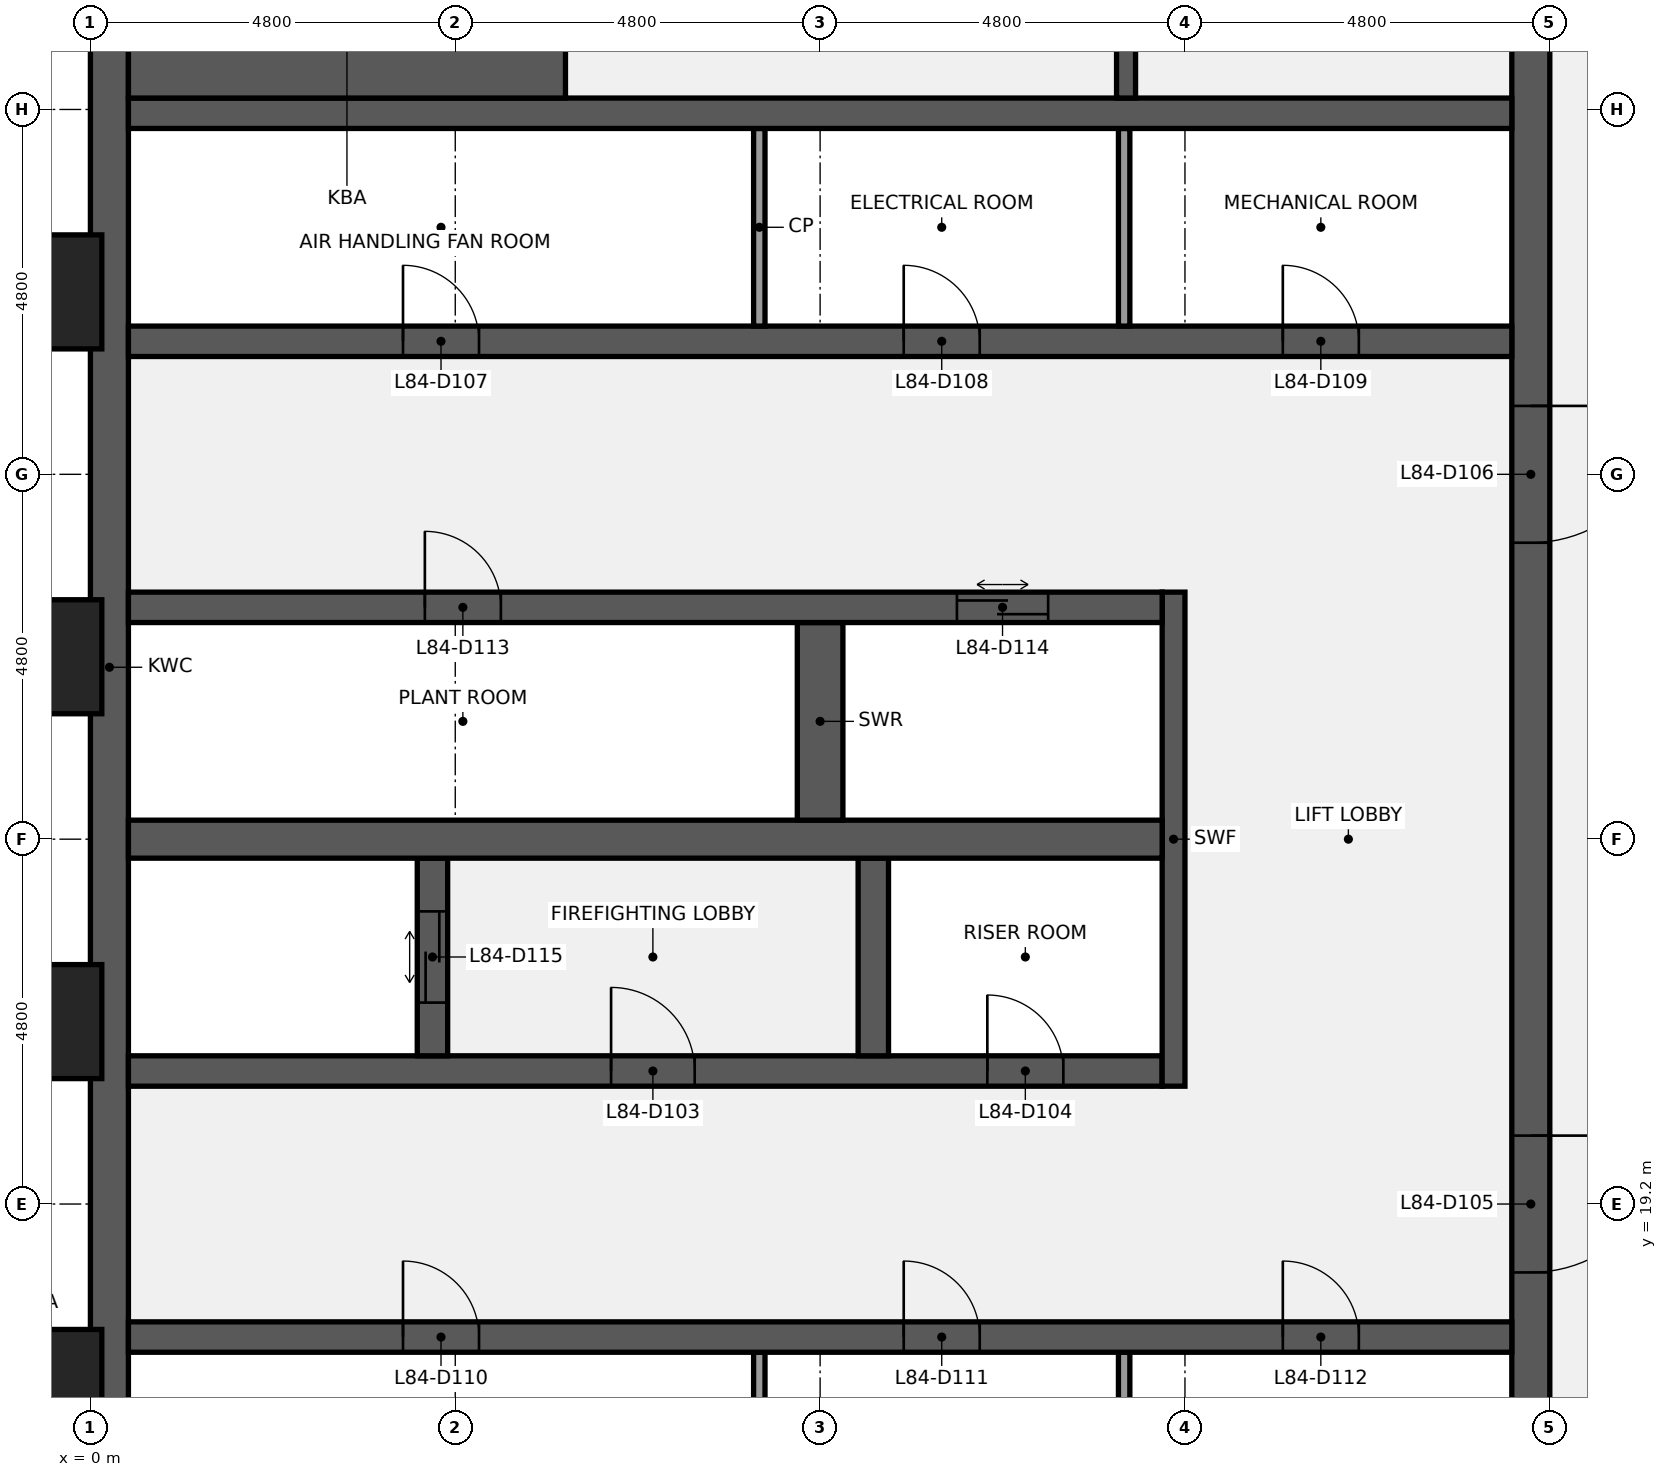
"""IFC4 building model, lengths in metres.
Left out: names, types, materials, properties, quantities, classifications, styles, units other than length and angle.
Written with IfcOpenShell. Run it as: python <this file> out.ifc"""

import sys

from ifc_helpers import new_model, si_unit, direction, frame, frame_2d, origin, origin_2d, place, context, subcontext, project, spatial, polyline, rectangle, outline, extrude, element, fill, save


model = new_model("IFC4")
c1 = context("Model", 3, precision=1e-05, world=origin(), true_north=direction((0.0, 1.0)))
c2 = subcontext(c1, "Body", "Model", "MODEL_VIEW")
j1 = project(units=[si_unit("LENGTHUNIT", "METRE"), si_unit("PLANEANGLEUNIT", "RADIAN")], contexts=[c1])
p1 = place(None, origin())
s1 = spatial("IfcSite", under=j1, at=p1, CompositionType="ELEMENT")
p2 = place(p1, origin())
s2 = spatial("IfcBuilding", under=s1, at=p2, CompositionType="ELEMENT")
p3 = place(p2, frame((0.0, 0.0, 374.3)))
s3 = spatial("IfcBuildingStorey", under=s2, at=p3, CompositionType="ELEMENT", Elevation=374.3)
p4 = place(p3, frame((0.25, 14.124, 0.0), z_axis=(0.0, 0.0, 1.0), x_axis=(0.0, 1.0, 0.0)))
e1 = element("IfcWall", 1, at=p4, inside=s3, PredefinedType="SHEAR", context=c2, shape_type="SweptSolid", body=[
    extrude(outline(polyline([(0.0, 0.0), (24.276, 0.0), (24.277, 27.067), (0.0, 2.488), (0.0, 0.0)])), frame((0.0, 0.25, 0.0), z_axis=(0.0, -1.0, 0.0), x_axis=(1.0, 0.0, 0.0)), (0.0, 0.0, 1.0), 0.5),
])
p5 = place(p3, frame((18.95, 38.4, 0.0), z_axis=(0.0, 0.0, 1.0), x_axis=(0.0, -1.0, 0.0)))
e2 = element("IfcWall", 2, at=p5, inside=s3, PredefinedType="SHEAR", context=c2, shape_type="SweptSolid", body=[
    extrude(outline(polyline([(0.0, 0.0), (24.276, 0.0), (24.277, 2.488), (0.0, 27.067), (0.0, 0.0)])), frame((0.0, 0.25, 0.0), z_axis=(0.0, -1.0, 0.0), x_axis=(1.0, 0.0, 0.0)), (0.0, 0.0, 1.0), 0.5),
])
p6 = place(p5, frame((18.3, 0.0, 0.0)))
e3 = element("IfcOpeningElement", 3, at=p6, cuts=e2, PredefinedType="OPENING", context=c2, shape_type="SweptSolid", body=[
    extrude(rectangle(XDim=1.8, YDim=2.1, at=frame_2d((0.9, 1.05))), frame((0.0, 0.26, 0.0), z_axis=(0.0, -1.0, 0.0), x_axis=(1.0, 0.0, 0.0)), (0.0, 0.0, 1.0), 0.52),
])
p7 = place(p5, frame((8.7, 0.0, 0.0)))
e4 = element("IfcOpeningElement", 4, at=p7, cuts=e2, PredefinedType="OPENING", context=c2, shape_type="SweptSolid", body=[
    extrude(rectangle(XDim=1.8, YDim=2.1, at=frame_2d((0.9, 1.05))), frame((0.0, 0.26, 0.0), z_axis=(0.0, -1.0, 0.0), x_axis=(1.0, 0.0, 0.0)), (0.0, 0.0, 1.0), 0.52),
])
for number, where, z_axis, x_axis in (
    (5, (8.8, 14.65, 0.0), (0.0, 0.0, 1.0), (0.0, 1.0, 0.0)),
    (6, (13.6, 14.65, 0.0), (0.0, 0.0, 1.0), (0.0, 1.0, 0.0)),
):
    element("IfcWall", number, at=place(p3, frame(where, z_axis=z_axis, x_axis=x_axis)), inside=s3, PredefinedType="PARTITIONING", context=c2, shape_type="SweptSolid", body=[
        extrude(outline(polyline([(0.0, 0.0), (2.6, 0.0), (2.6, 5.653), (0.0, 3.021), (0.0, 0.0)])), frame((0.0, 0.075, 0.0), z_axis=(0.0, -1.0, 0.0), x_axis=(1.0, 0.0, 0.0)), (0.0, 0.0, 1.0), 0.15),
    ])
p8 = place(p3, frame((0.5, 17.45, 0.0), z_axis=(0.0, 0.0, 1.0), x_axis=(1.0, 0.0, 0.0)))
e7 = element("IfcWall", 7, at=p8, inside=s3, PredefinedType="SHEAR", context=c2, shape_type="SweptSolid", body=[
    extrude(outline(polyline([(0.0, 0.0), (18.2, 0.0), (18.2, 5.855), (0.0, 5.855), (0.0, 0.0)])), frame((0.0, 0.2, 0.0), z_axis=(0.0, -1.0, 0.0), x_axis=(1.0, 0.0, 0.0)), (0.0, 0.0, 1.0), 0.4),
])
p9 = place(p8, frame((3.613, 0.0, 0.0)))
e8 = element("IfcOpeningElement", 8, at=p9, cuts=e7, PredefinedType="OPENING", context=c2, shape_type="SweptSolid", body=[
    extrude(rectangle(XDim=1.0, YDim=2.1, at=frame_2d((0.5, 1.05))), frame((0.0, 0.21, 0.0), z_axis=(0.0, -1.0, 0.0), x_axis=(1.0, 0.0, 0.0)), (0.0, 0.0, 1.0), 0.42),
])
p10 = place(p8, frame((10.2, 0.0, 0.0)))
e9 = element("IfcOpeningElement", 9, at=p10, cuts=e7, PredefinedType="OPENING", context=c2, shape_type="SweptSolid", body=[
    extrude(rectangle(XDim=1.0, YDim=2.1, at=frame_2d((0.5, 1.05))), frame((0.0, 0.21, 0.0), z_axis=(0.0, -1.0, 0.0), x_axis=(1.0, 0.0, 0.0)), (0.0, 0.0, 1.0), 0.42),
])
p11 = place(p8, frame((15.188, 0.0, 0.0)))
e10 = element("IfcOpeningElement", 10, at=p11, cuts=e7, PredefinedType="OPENING", context=c2, shape_type="SweptSolid", body=[
    extrude(rectangle(XDim=1.0, YDim=2.1, at=frame_2d((0.5, 1.05))), frame((0.0, 0.21, 0.0), z_axis=(0.0, -1.0, 0.0), x_axis=(1.0, 0.0, 0.0)), (0.0, 0.0, 1.0), 0.42),
])
p12 = place(p3, frame((0.5, 20.95, 0.0), z_axis=(0.0, 0.0, 1.0), x_axis=(1.0, 0.0, 0.0)))
e11 = element("IfcWall", 11, at=p12, inside=s3, PredefinedType="SHEAR", context=c2, shape_type="SweptSolid", body=[
    extrude(outline(polyline([(0.0, 0.0), (13.6, 0.0), (13.6, 9.399), (0.0, 9.399), (0.0, 0.0)])), frame((0.0, 0.2, 0.0), z_axis=(0.0, -1.0, 0.0), x_axis=(1.0, 0.0, 0.0)), (0.0, 0.0, 1.0), 0.4),
])
p13 = place(p12, frame((6.35, 0.0, 0.0)))
e12 = element("IfcOpeningElement", 12, at=p13, cuts=e11, PredefinedType="OPENING", context=c2, shape_type="SweptSolid", body=[
    extrude(rectangle(XDim=1.1, YDim=2.1, at=frame_2d((0.55, 1.05))), frame((0.0, 0.21, 0.0), z_axis=(0.0, -1.0, 0.0), x_axis=(1.0, 0.0, 0.0)), (0.0, 0.0, 1.0), 0.42),
])
p14 = place(p12, frame((11.3, 0.0, 0.0)))
e13 = element("IfcOpeningElement", 13, at=p14, cuts=e11, PredefinedType="OPENING", context=c2, shape_type="SweptSolid", body=[
    extrude(rectangle(XDim=1.0, YDim=2.1, at=frame_2d((0.5, 1.05))), frame((0.0, 0.21, 0.0), z_axis=(0.0, -1.0, 0.0), x_axis=(1.0, 0.0, 0.0)), (0.0, 0.0, 1.0), 0.42),
])
p15 = place(p3, frame((14.25, 20.75, 0.0), z_axis=(0.0, 0.0, 1.0), x_axis=(0.0, 1.0, 0.0)))
e14 = element("IfcWall", 14, at=p15, inside=s3, PredefinedType="SHEAR", context=c2, shape_type="SweptSolid", body=[
    extrude(outline(polyline([(0.0, 0.0), (6.5, 0.0), (6.5, 15.778), (0.0, 9.197), (0.0, 0.0)])), frame((0.0, 0.15, 0.0), z_axis=(0.0, -1.0, 0.0), x_axis=(1.0, 0.0, 0.0)), (0.0, 0.0, 1.0), 0.3),
])
p16 = place(p3, frame((4.5, 21.15, 0.0), z_axis=(0.0, 0.0, 1.0), x_axis=(0.0, 1.0, 0.0)))
e15 = element("IfcWall", 15, at=p16, inside=s3, PredefinedType="SHEAR", context=c2, shape_type="SweptSolid", body=[
    extrude(outline(polyline([(0.0, 0.0), (2.6, 0.0), (2.6, 12.234), (0.0, 9.602), (0.0, 0.0)])), frame((0.0, 0.2, 0.0), z_axis=(0.0, -1.0, 0.0), x_axis=(1.0, 0.0, 0.0)), (0.0, 0.0, 1.0), 0.4),
])
p17 = place(p16, frame((0.7, 0.0, 0.0)))
e16 = element("IfcOpeningElement", 16, at=p17, cuts=e15, PredefinedType="OPENING", context=c2, shape_type="SweptSolid", body=[
    extrude(rectangle(XDim=1.2, YDim=2.1, at=frame_2d((0.6, 1.05))), frame((0.0, 0.21, 0.0), z_axis=(0.0, -1.0, 0.0), x_axis=(1.0, 0.0, 0.0)), (0.0, 0.0, 1.0), 0.42),
])
p18 = place(p3, frame((10.3, 21.15, 0.0), z_axis=(0.0, 0.0, 1.0), x_axis=(0.0, 1.0, 0.0)))
e17 = element("IfcWall", 17, at=p18, inside=s3, PredefinedType="SHEAR", context=c2, shape_type="SweptSolid", body=[
    extrude(outline(polyline([(0.0, 0.0), (2.6, 0.0), (2.6, 12.234), (0.0, 9.602), (0.0, 0.0)])), frame((0.0, 0.2, 0.0), z_axis=(0.0, -1.0, 0.0), x_axis=(1.0, 0.0, 0.0)), (0.0, 0.0, 1.0), 0.4),
])
p19 = place(p3, frame((0.5, 24.0, 0.0), z_axis=(0.0, 0.0, 1.0), x_axis=(1.0, 0.0, 0.0)))
e18 = element("IfcWall", 18, at=p19, inside=s3, PredefinedType="SHEAR", context=c2, shape_type="SweptSolid", body=[
    extrude(outline(polyline([(0.0, 0.0), (13.6, 0.0), (13.6, 12.488), (0.0, 12.488), (0.0, 0.0)])), frame((0.0, 0.25, 0.0), z_axis=(0.0, -1.0, 0.0), x_axis=(1.0, 0.0, 0.0)), (0.0, 0.0, 1.0), 0.5),
])
p20 = place(p3, frame((9.6, 24.25, 0.0), z_axis=(0.0, 0.0, 1.0), x_axis=(0.0, 1.0, 0.0)))
e19 = element("IfcWall", 19, at=p20, inside=s3, PredefinedType="SHEAR", context=c2, shape_type="SweptSolid", body=[
    extrude(outline(polyline([(0.0, 0.0), (2.6, 0.0), (2.6, 15.373), (0.0, 12.74), (0.0, 0.0)])), frame((0.0, 0.3, 0.0), z_axis=(0.0, -1.0, 0.0), x_axis=(1.0, 0.0, 0.0)), (0.0, 0.0, 1.0), 0.6),
])
p21 = place(p3, frame((0.5, 27.05, 0.0), z_axis=(0.0, 0.0, 1.0), x_axis=(1.0, 0.0, 0.0)))
e20 = element("IfcWall", 20, at=p21, inside=s3, PredefinedType="SHEAR", context=c2, shape_type="SweptSolid", body=[
    extrude(outline(polyline([(0.0, 0.0), (13.6, 0.0), (13.6, 15.576), (0.0, 15.576), (0.0, 0.0)])), frame((0.0, 0.2, 0.0), z_axis=(0.0, -1.0, 0.0), x_axis=(1.0, 0.0, 0.0)), (0.0, 0.0, 1.0), 0.4),
])
p22 = place(p21, frame((3.9, 0.0, 0.0)))
e21 = element("IfcOpeningElement", 21, at=p22, cuts=e20, PredefinedType="OPENING", context=c2, shape_type="SweptSolid", body=[
    extrude(rectangle(XDim=1.0, YDim=2.1, at=frame_2d((0.5, 1.05))), frame((0.0, 0.21, 0.0), z_axis=(0.0, -1.0, 0.0), x_axis=(1.0, 0.0, 0.0)), (0.0, 0.0, 1.0), 0.42),
])
p23 = place(p21, frame((10.9, 0.0, 0.0)))
e22 = element("IfcOpeningElement", 22, at=p23, cuts=e20, PredefinedType="OPENING", context=c2, shape_type="SweptSolid", body=[
    extrude(rectangle(XDim=1.2, YDim=2.1, at=frame_2d((0.6, 1.05))), frame((0.0, 0.21, 0.0), z_axis=(0.0, -1.0, 0.0), x_axis=(1.0, 0.0, 0.0)), (0.0, 0.0, 1.0), 0.42),
])
p24 = place(p3, frame((0.5, 30.55, 0.0), z_axis=(0.0, 0.0, 1.0), x_axis=(1.0, 0.0, 0.0)))
e23 = element("IfcWall", 23, at=p24, inside=s3, PredefinedType="SHEAR", context=c2, shape_type="SweptSolid", body=[
    extrude(outline(polyline([(0.0, 0.0), (18.2, 0.0), (18.2, 19.119), (0.0, 19.119), (0.0, 0.0)])), frame((0.0, 0.2, 0.0), z_axis=(0.0, -1.0, 0.0), x_axis=(1.0, 0.0, 0.0)), (0.0, 0.0, 1.0), 0.4),
])
p25 = place(p24, frame((3.613, 0.0, 0.0)))
e24 = element("IfcOpeningElement", 24, at=p25, cuts=e23, PredefinedType="OPENING", context=c2, shape_type="SweptSolid", body=[
    extrude(rectangle(XDim=1.0, YDim=2.1, at=frame_2d((0.5, 1.05))), frame((0.0, 0.21, 0.0), z_axis=(0.0, -1.0, 0.0), x_axis=(1.0, 0.0, 0.0)), (0.0, 0.0, 1.0), 0.42),
])
p26 = place(p24, frame((10.2, 0.0, 0.0)))
e25 = element("IfcOpeningElement", 25, at=p26, cuts=e23, PredefinedType="OPENING", context=c2, shape_type="SweptSolid", body=[
    extrude(rectangle(XDim=1.0, YDim=2.1, at=frame_2d((0.5, 1.05))), frame((0.0, 0.21, 0.0), z_axis=(0.0, -1.0, 0.0), x_axis=(1.0, 0.0, 0.0)), (0.0, 0.0, 1.0), 0.42),
])
p27 = place(p24, frame((15.188, 0.0, 0.0)))
e26 = element("IfcOpeningElement", 26, at=p27, cuts=e23, PredefinedType="OPENING", context=c2, shape_type="SweptSolid", body=[
    extrude(rectangle(XDim=1.0, YDim=2.1, at=frame_2d((0.5, 1.05))), frame((0.0, 0.21, 0.0), z_axis=(0.0, -1.0, 0.0), x_axis=(1.0, 0.0, 0.0)), (0.0, 0.0, 1.0), 0.42),
])
for number, where, z_axis, x_axis in (
    (27, (8.8, 30.75, 0.0), (0.0, 0.0, 1.0), (0.0, 1.0, 0.0)),
    (28, (13.6, 30.75, 0.0), (0.0, 0.0, 1.0), (0.0, 1.0, 0.0)),
):
    element("IfcWall", number, at=place(p3, frame(where, z_axis=z_axis, x_axis=x_axis)), inside=s3, PredefinedType="PARTITIONING", context=c2, shape_type="SweptSolid", body=[
        extrude(outline(polyline([(0.0, 0.0), (2.6, 0.0), (2.6, 21.954), (0.0, 19.322), (0.0, 0.0)])), frame((0.0, 0.075, 0.0), z_axis=(0.0, -1.0, 0.0), x_axis=(1.0, 0.0, 0.0)), (0.0, 0.0, 1.0), 0.15),
    ])
p28 = place(p3, frame((0.5, 33.55, 0.0), z_axis=(0.0, 0.0, 1.0), x_axis=(1.0, 0.0, 0.0)))
e29 = element("IfcWall", 29, at=p28, inside=s3, PredefinedType="SHEAR", context=c2, shape_type="SweptSolid", body=[
    extrude(outline(polyline([(0.0, 0.0), (18.2, 0.0), (18.2, 22.157), (0.0, 22.157), (0.0, 0.0)])), frame((0.0, 0.2, 0.0), z_axis=(0.0, -1.0, 0.0), x_axis=(1.0, 0.0, 0.0)), (0.0, 0.0, 1.0), 0.4),
])
p29 = place(p3, frame((0.5, 35.825, 0.0), z_axis=(0.0, 0.0, 1.0), x_axis=(1.0, 0.0, 0.0)))
e30 = element("IfcWall", 30, at=p29, inside=s3, PredefinedType="SHEAR", context=c2, shape_type="SweptSolid", body=[
    extrude(outline(polyline([(0.0, 0.0), (5.75, 0.0), (5.75, 24.46), (0.0, 24.46), (0.0, 0.0)])), frame((0.0, 2.075, 0.0), z_axis=(0.0, -1.0, 0.0), x_axis=(1.0, 0.0, 0.0)), (0.0, 0.0, 1.0), 4.15),
])
p30 = place(p3, frame((13.625, 33.75, 0.0), z_axis=(0.0, 0.0, 1.0), x_axis=(0.0, 1.0, 0.0)))
e31 = element("IfcWall", 31, at=p30, inside=s3, PredefinedType="SHEAR", context=c2, shape_type="SweptSolid", body=[
    extrude(outline(polyline([(0.0, 0.0), (3.45, 0.0), (3.45, 25.853), (0.0, 22.359), (0.0, 0.0)])), frame((0.0, 0.125, 0.0), z_axis=(0.0, -1.0, 0.0), x_axis=(1.0, 0.0, 0.0)), (0.0, 0.0, 1.0), 0.25),
])
p31 = place(p30, frame((1.175, 0.0, 0.0)))
e32 = element("IfcOpeningElement", 32, at=p31, cuts=e31, PredefinedType="OPENING", context=c2, shape_type="SweptSolid", body=[
    extrude(rectangle(XDim=1.1, YDim=2.1, at=frame_2d((0.55, 1.05))), frame((0.0, 0.135, 0.0), z_axis=(0.0, -1.0, 0.0), x_axis=(1.0, 0.0, 0.0)), (0.0, 0.0, 1.0), 0.27),
])
for number, where, z_axis, x_axis in (
    (33, (-0.75, 16.8, 0.0), (0.0, 0.0, 1.0), (0.0, 1.0, 0.0)),
    (34, (-0.75, 21.6, 0.0), (0.0, 0.0, 1.0), (0.0, 1.0, 0.0)),
    (35, (-0.75, 26.4, 0.0), (0.0, 0.0, 1.0), (0.0, 1.0, 0.0)),
    (36, (-0.75, 31.2, 0.0), (0.0, 0.0, 1.0), (0.0, 1.0, 0.0)),
):
    element("IfcColumn", number, at=place(p3, frame(where, z_axis=z_axis, x_axis=x_axis)), inside=s3, PredefinedType="PILASTER", context=c2, shape_type="SweptSolid", body=[
        extrude(rectangle(XDim=1.8, YDim=1.5, at=origin_2d()), origin(), (0.0, 0.0, 1.0), 4.0),
    ])
p32 = place(p13, origin())
e37 = element("IfcDoor", 37, at=p32, inside=s3, OperationType="SINGLE_SWING_LEFT", PredefinedType="DOOR", context=c2, shape_type="SweptSolid", body=[
    extrude(rectangle(XDim=1.1, YDim=2.1, at=frame_2d((0.55, 1.05))), frame((0.0, 0.025, 0.0), z_axis=(0.0, -1.0, 0.0), x_axis=(1.0, 0.0, 0.0)), (0.0, 0.0, 1.0), 0.05),
])
fill(e12, e37)
p33 = place(p14, origin())
e38 = element("IfcDoor", 38, at=p33, inside=s3, OperationType="SINGLE_SWING_LEFT", PredefinedType="DOOR", context=c2, shape_type="SweptSolid", body=[
    extrude(rectangle(XDim=1.0, YDim=2.1, at=frame_2d((0.5, 1.05))), frame((0.0, 0.025, 0.0), z_axis=(0.0, -1.0, 0.0), x_axis=(1.0, 0.0, 0.0)), (0.0, 0.0, 1.0), 0.05),
])
fill(e13, e38)
p34 = place(p6, origin())
e39 = element("IfcDoor", 39, at=p34, inside=s3, OperationType="DOUBLE_DOOR_SINGLE_SWING", PredefinedType="DOOR", context=c2, shape_type="SweptSolid", body=[
    extrude(rectangle(XDim=1.8, YDim=2.1, at=frame_2d((0.9, 1.05))), frame((0.0, 0.025, 0.0), z_axis=(0.0, -1.0, 0.0), x_axis=(1.0, 0.0, 0.0)), (0.0, 0.0, 1.0), 0.05),
])
fill(e3, e39)
p35 = place(p7, origin())
e40 = element("IfcDoor", 40, at=p35, inside=s3, OperationType="DOUBLE_DOOR_SINGLE_SWING", PredefinedType="DOOR", context=c2, shape_type="SweptSolid", body=[
    extrude(rectangle(XDim=1.8, YDim=2.1, at=frame_2d((0.9, 1.05))), frame((0.0, 0.025, 0.0), z_axis=(0.0, -1.0, 0.0), x_axis=(1.0, 0.0, 0.0)), (0.0, 0.0, 1.0), 0.05),
])
fill(e4, e40)
p36 = place(p25, origin())
e41 = element("IfcDoor", 41, at=p36, inside=s3, OperationType="SINGLE_SWING_LEFT", PredefinedType="DOOR", context=c2, shape_type="SweptSolid", body=[
    extrude(rectangle(XDim=1.0, YDim=2.1, at=frame_2d((0.5, 1.05))), frame((0.0, 0.025, 0.0), z_axis=(0.0, -1.0, 0.0), x_axis=(1.0, 0.0, 0.0)), (0.0, 0.0, 1.0), 0.05),
])
fill(e24, e41)
p37 = place(p26, origin())
e42 = element("IfcDoor", 42, at=p37, inside=s3, OperationType="SINGLE_SWING_LEFT", PredefinedType="DOOR", context=c2, shape_type="SweptSolid", body=[
    extrude(rectangle(XDim=1.0, YDim=2.1, at=frame_2d((0.5, 1.05))), frame((0.0, 0.025, 0.0), z_axis=(0.0, -1.0, 0.0), x_axis=(1.0, 0.0, 0.0)), (0.0, 0.0, 1.0), 0.05),
])
fill(e25, e42)
p38 = place(p27, origin())
e43 = element("IfcDoor", 43, at=p38, inside=s3, OperationType="SINGLE_SWING_LEFT", PredefinedType="DOOR", context=c2, shape_type="SweptSolid", body=[
    extrude(rectangle(XDim=1.0, YDim=2.1, at=frame_2d((0.5, 1.05))), frame((0.0, 0.025, 0.0), z_axis=(0.0, -1.0, 0.0), x_axis=(1.0, 0.0, 0.0)), (0.0, 0.0, 1.0), 0.05),
])
fill(e26, e43)
p39 = place(p9, origin())
e44 = element("IfcDoor", 44, at=p39, inside=s3, OperationType="SINGLE_SWING_LEFT", PredefinedType="DOOR", context=c2, shape_type="SweptSolid", body=[
    extrude(rectangle(XDim=1.0, YDim=2.1, at=frame_2d((0.5, 1.05))), frame((0.0, 0.025, 0.0), z_axis=(0.0, -1.0, 0.0), x_axis=(1.0, 0.0, 0.0)), (0.0, 0.0, 1.0), 0.05),
])
fill(e8, e44)
p40 = place(p10, origin())
e45 = element("IfcDoor", 45, at=p40, inside=s3, OperationType="SINGLE_SWING_LEFT", PredefinedType="DOOR", context=c2, shape_type="SweptSolid", body=[
    extrude(rectangle(XDim=1.0, YDim=2.1, at=frame_2d((0.5, 1.05))), frame((0.0, 0.025, 0.0), z_axis=(0.0, -1.0, 0.0), x_axis=(1.0, 0.0, 0.0)), (0.0, 0.0, 1.0), 0.05),
])
fill(e9, e45)
p41 = place(p11, origin())
e46 = element("IfcDoor", 46, at=p41, inside=s3, OperationType="SINGLE_SWING_LEFT", PredefinedType="DOOR", context=c2, shape_type="SweptSolid", body=[
    extrude(rectangle(XDim=1.0, YDim=2.1, at=frame_2d((0.5, 1.05))), frame((0.0, 0.025, 0.0), z_axis=(0.0, -1.0, 0.0), x_axis=(1.0, 0.0, 0.0)), (0.0, 0.0, 1.0), 0.05),
])
fill(e10, e46)
p42 = place(p22, origin())
e47 = element("IfcDoor", 47, at=p42, inside=s3, OperationType="SINGLE_SWING_LEFT", PredefinedType="DOOR", context=c2, shape_type="SweptSolid", body=[
    extrude(rectangle(XDim=1.0, YDim=2.1, at=frame_2d((0.5, 1.05))), frame((0.0, 0.025, 0.0), z_axis=(0.0, -1.0, 0.0), x_axis=(1.0, 0.0, 0.0)), (0.0, 0.0, 1.0), 0.05),
])
fill(e21, e47)
p43 = place(p23, origin())
e48 = element("IfcDoor", 48, at=p43, inside=s3, OperationType="DOUBLE_DOOR_SLIDING", PredefinedType="DOOR", context=c2, shape_type="SweptSolid", body=[
    extrude(rectangle(XDim=1.2, YDim=2.1, at=frame_2d((0.6, 1.05))), frame((0.0, 0.025, 0.0), z_axis=(0.0, -1.0, 0.0), x_axis=(1.0, 0.0, 0.0)), (0.0, 0.0, 1.0), 0.05),
])
fill(e22, e48)
p44 = place(p17, origin())
e49 = element("IfcDoor", 49, at=p44, inside=s3, OperationType="DOUBLE_DOOR_SLIDING", PredefinedType="DOOR", context=c2, shape_type="SweptSolid", body=[
    extrude(rectangle(XDim=1.2, YDim=2.1, at=frame_2d((0.6, 1.05))), frame((0.0, 0.025, 0.0), z_axis=(0.0, -1.0, 0.0), x_axis=(1.0, 0.0, 0.0)), (0.0, 0.0, 1.0), 0.05),
])
fill(e16, e49)
save(model, sys.argv[1])
